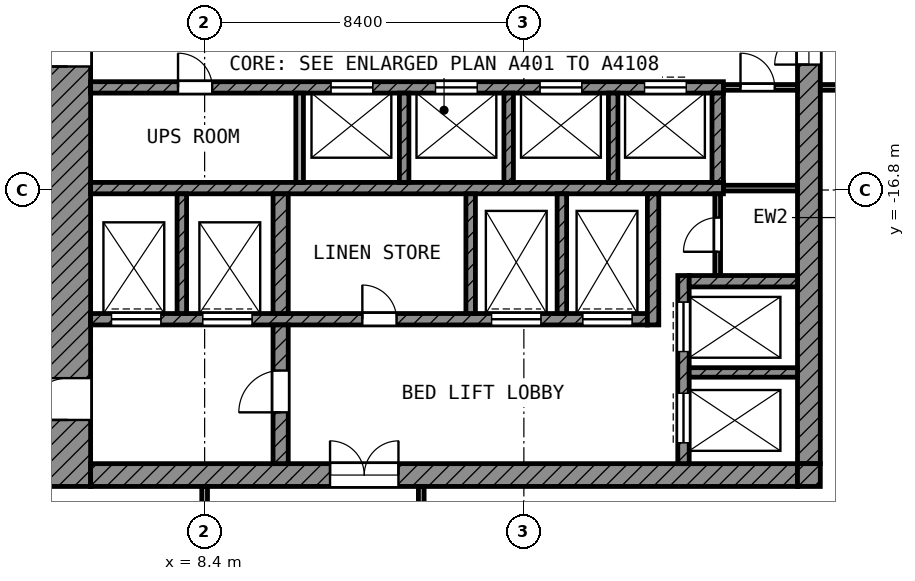
"""IFC4 building model, lengths in metres.
Left out: names, types, materials, properties, quantities, classifications, styles, units other than length and angle.
Written with IfcOpenShell. Run it as: python <this file> out.ifc"""

import sys

from ifc_helpers import new_model, si_unit, direction, frame, frame_2d, origin, place, context, subcontext, project, spatial, rectangle, extrude, element, fill, save


model = new_model("IFC4")
c1 = context("Model", 3, precision=1e-05, world=origin(), true_north=direction((0.0, 1.0)))
c2 = subcontext(c1, "Body", "Model", "MODEL_VIEW")
j1 = project(units=[si_unit("LENGTHUNIT", "METRE"), si_unit("PLANEANGLEUNIT", "RADIAN")], contexts=[c1])
p1 = place(None, origin())
s1 = spatial("IfcSite", under=j1, at=p1, CompositionType="ELEMENT")
p2 = place(p1, origin())
s2 = spatial("IfcBuilding", under=s1, at=p2, CompositionType="ELEMENT")
p3 = place(p2, frame((0.0, 0.0, 332.2)))
s3 = spatial("IfcBuildingStorey", under=s2, at=p3, CompositionType="ELEMENT", Elevation=332.2)
p4 = place(p3, frame((4.8, -24.6, 0.0), z_axis=(0.0, 0.0, 1.0), x_axis=(0.0, 1.0, 0.0)))
e1 = element("IfcWall", 1, at=p4, inside=s3, PredefinedType="SHEAR", context=c2, shape_type="SweptSolid", body=[
    extrude(rectangle(XDim=19.2, YDim=1.2, at=frame_2d((9.6, 0.0))), origin(), (0.0, 0.0, 1.0), 3.95),
])
p5 = place(p4, frame((11.05, 0.0, 0.0)))
e2 = element("IfcOpeningElement", 2, at=p5, cuts=e1, PredefinedType="OPENING", context=c2, shape_type="SweptSolid", body=[
    extrude(rectangle(XDim=1.1, YDim=2.1, at=frame_2d((0.55, 1.05))), frame((0.0, 0.61, 0.0), z_axis=(0.0, -1.0, 0.0), x_axis=(1.0, 0.0, 0.0)), (0.0, 0.0, 1.0), 1.22),
])
p6 = place(p4, frame((1.75, 0.0, 0.0)))
e3 = element("IfcOpeningElement", 3, at=p6, cuts=e1, PredefinedType="OPENING", context=c2, shape_type="SweptSolid", body=[
    extrude(rectangle(XDim=1.1, YDim=2.1, at=frame_2d((0.55, 1.05))), frame((0.0, 0.61, 0.0), z_axis=(0.0, -1.0, 0.0), x_axis=(1.0, 0.0, 0.0)), (0.0, 0.0, 1.0), 1.22),
])
p7 = place(p3, frame((24.3, -24.0, 0.0), z_axis=(0.0, 0.0, 1.0), x_axis=(0.0, 1.0, 0.0)))
e4 = element("IfcWall", 4, at=p7, inside=s3, PredefinedType="SHEAR", context=c2, shape_type="SweptSolid", body=[
    extrude(rectangle(XDim=18.6, YDim=0.6, at=frame_2d((9.3, 0.0))), origin(), (0.0, 0.0, 1.0), 3.95),
])
p8 = place(p7, frame((10.5, 0.0, 0.0)))
e5 = element("IfcOpeningElement", 5, at=p8, cuts=e4, PredefinedType="OPENING", context=c2, shape_type="SweptSolid", body=[
    extrude(rectangle(XDim=1.8, YDim=2.1, at=frame_2d((0.9, 1.05))), frame((0.0, 0.31, 0.0), z_axis=(0.0, -1.0, 0.0), x_axis=(1.0, 0.0, 0.0)), (0.0, 0.0, 1.0), 0.62),
])
p9 = place(p3, frame((5.4, -24.3, 0.0), z_axis=(0.0, 0.0, 1.0), x_axis=(1.0, 0.0, 0.0)))
e6 = element("IfcWall", 6, at=p9, inside=s3, PredefinedType="SHEAR", context=c2, shape_type="SweptSolid", body=[
    extrude(rectangle(XDim=18.6, YDim=0.6, at=frame_2d((9.3, 0.0))), origin(), (0.0, 0.0, 1.0), 3.95),
])
p10 = place(p9, frame((6.3, 0.0, 0.0)))
e7 = element("IfcOpeningElement", 7, at=p10, cuts=e6, PredefinedType="OPENING", context=c2, shape_type="SweptSolid", body=[
    extrude(rectangle(XDim=1.8, YDim=2.1, at=frame_2d((0.9, 1.05))), frame((0.0, 0.31, 0.0), z_axis=(0.0, -1.0, 0.0), x_axis=(1.0, 0.0, 0.0)), (0.0, 0.0, 1.0), 0.62),
])
p11 = place(p3, frame((24.3, -24.6, 0.0), z_axis=(0.0, 0.0, 1.0), x_axis=(0.0, 1.0, 0.0)))
e8 = element("IfcWall", 8, at=p11, inside=s3, PredefinedType="SHEAR", context=c2, shape_type="SweptSolid", body=[
    extrude(rectangle(XDim=0.6, YDim=0.6, at=frame_2d((0.3, 0.0))), origin(), (0.0, 0.0, 1.0), 3.95),
])
p12 = place(p3, frame((5.4, -14.1, 0.0), z_axis=(0.0, 0.0, 1.0), x_axis=(1.0, 0.0, 0.0)))
e9 = element("IfcWall", 9, at=p12, inside=s3, PredefinedType="SHEAR", context=c2, shape_type="SweptSolid", body=[
    extrude(rectangle(XDim=16.65, YDim=0.3, at=frame_2d((8.325, 0.0))), origin(), (0.0, 0.0, 1.0), 3.95),
])
p13 = place(p12, frame((6.325, 0.0, 0.0)))
e10 = element("IfcOpeningElement", 10, at=p13, cuts=e9, PredefinedType="OPENING", context=c2, shape_type="SweptSolid", body=[
    extrude(rectangle(XDim=1.1, YDim=2.1, at=frame_2d((0.55, 1.05))), frame((0.0, 0.16, 0.0), z_axis=(0.0, -1.0, 0.0), x_axis=(1.0, 0.0, 0.0)), (0.0, 0.0, 1.0), 0.32),
])
p14 = place(p12, frame((9.075, 0.0, 0.0)))
e11 = element("IfcOpeningElement", 11, at=p14, cuts=e9, PredefinedType="OPENING", context=c2, shape_type="SweptSolid", body=[
    extrude(rectangle(XDim=1.1, YDim=2.1, at=frame_2d((0.55, 1.05))), frame((0.0, 0.16, 0.0), z_axis=(0.0, -1.0, 0.0), x_axis=(1.0, 0.0, 0.0)), (0.0, 0.0, 1.0), 0.32),
])
p15 = place(p12, frame((11.825, 0.0, 0.0)))
e12 = element("IfcOpeningElement", 12, at=p15, cuts=e9, PredefinedType="OPENING", context=c2, shape_type="SweptSolid", body=[
    extrude(rectangle(XDim=1.1, YDim=2.1, at=frame_2d((0.55, 1.05))), frame((0.0, 0.16, 0.0), z_axis=(0.0, -1.0, 0.0), x_axis=(1.0, 0.0, 0.0)), (0.0, 0.0, 1.0), 0.32),
])
p16 = place(p12, frame((14.575, 0.0, 0.0)))
e13 = element("IfcOpeningElement", 13, at=p16, cuts=e9, PredefinedType="OPENING", context=c2, shape_type="SweptSolid", body=[
    extrude(rectangle(XDim=1.1, YDim=2.1, at=frame_2d((0.55, 1.05))), frame((0.0, 0.16, 0.0), z_axis=(0.0, -1.0, 0.0), x_axis=(1.0, 0.0, 0.0)), (0.0, 0.0, 1.0), 0.32),
])
p17 = place(p12, frame((2.3, 0.0, 0.0)))
e14 = element("IfcOpeningElement", 14, at=p17, cuts=e9, PredefinedType="OPENING", context=c2, shape_type="SweptSolid", body=[
    extrude(rectangle(XDim=0.9, YDim=2.1, at=frame_2d((0.45, 1.05))), frame((0.0, 0.16, 0.0), z_axis=(0.0, -1.0, 0.0), x_axis=(1.0, 0.0, 0.0)), (0.0, 0.0, 1.0), 0.32),
])
p18 = place(p3, frame((5.4, -16.75, 0.0), z_axis=(0.0, 0.0, 1.0), x_axis=(1.0, 0.0, 0.0)))
e15 = element("IfcWall", 15, at=p18, inside=s3, PredefinedType="SHEAR", context=c2, shape_type="SweptSolid", body=[
    extrude(rectangle(XDim=16.65, YDim=0.3, at=frame_2d((8.325, 0.0))), origin(), (0.0, 0.0, 1.0), 3.95),
])
p19 = place(p3, frame((5.4, -20.2, 0.0), z_axis=(0.0, 0.0, 1.0), x_axis=(1.0, 0.0, 0.0)))
e16 = element("IfcWall", 16, at=p19, inside=s3, PredefinedType="SHEAR", context=c2, shape_type="SweptSolid", body=[
    extrude(rectangle(XDim=14.65, YDim=0.3, at=frame_2d((7.325, 0.0))), origin(), (0.0, 0.0, 1.0), 3.95),
])
p20 = place(p19, frame((10.55, 0.0, 0.0)))
e17 = element("IfcOpeningElement", 17, at=p20, cuts=e16, PredefinedType="OPENING", context=c2, shape_type="SweptSolid", body=[
    extrude(rectangle(XDim=1.3, YDim=2.1, at=frame_2d((0.65, 1.05))), frame((0.0, 0.16, 0.0), z_axis=(0.0, -1.0, 0.0), x_axis=(1.0, 0.0, 0.0)), (0.0, 0.0, 1.0), 0.32),
])
p21 = place(p19, frame((12.95, 0.0, 0.0)))
e18 = element("IfcOpeningElement", 18, at=p21, cuts=e16, PredefinedType="OPENING", context=c2, shape_type="SweptSolid", body=[
    extrude(rectangle(XDim=1.3, YDim=2.1, at=frame_2d((0.65, 1.05))), frame((0.0, 0.16, 0.0), z_axis=(0.0, -1.0, 0.0), x_axis=(1.0, 0.0, 0.0)), (0.0, 0.0, 1.0), 0.32),
])
p22 = place(p19, frame((0.55, 0.0, 0.0)))
e19 = element("IfcOpeningElement", 19, at=p22, cuts=e16, PredefinedType="OPENING", context=c2, shape_type="SweptSolid", body=[
    extrude(rectangle(XDim=1.3, YDim=2.1, at=frame_2d((0.65, 1.05))), frame((0.0, 0.16, 0.0), z_axis=(0.0, -1.0, 0.0), x_axis=(1.0, 0.0, 0.0)), (0.0, 0.0, 1.0), 0.32),
])
p23 = place(p19, frame((2.95, 0.0, 0.0)))
e20 = element("IfcOpeningElement", 20, at=p23, cuts=e16, PredefinedType="OPENING", context=c2, shape_type="SweptSolid", body=[
    extrude(rectangle(XDim=1.3, YDim=2.1, at=frame_2d((0.65, 1.05))), frame((0.0, 0.16, 0.0), z_axis=(0.0, -1.0, 0.0), x_axis=(1.0, 0.0, 0.0)), (0.0, 0.0, 1.0), 0.32),
])
p24 = place(p19, frame((7.15, 0.0, 0.0)))
e21 = element("IfcOpeningElement", 21, at=p24, cuts=e16, PredefinedType="OPENING", context=c2, shape_type="SweptSolid", body=[
    extrude(rectangle(XDim=0.9, YDim=2.1, at=frame_2d((0.45, 1.05))), frame((0.0, 0.16, 0.0), z_axis=(0.0, -1.0, 0.0), x_axis=(1.0, 0.0, 0.0)), (0.0, 0.0, 1.0), 0.32),
])
p25 = place(p3, frame((10.4, -24.0, 0.0), z_axis=(0.0, 0.0, 1.0), x_axis=(0.0, 1.0, 0.0)))
e22 = element("IfcWall", 22, at=p25, inside=s3, PredefinedType="SHEAR", context=c2, shape_type="SweptSolid", body=[
    extrude(rectangle(XDim=3.65, YDim=0.4, at=frame_2d((1.825, 0.0))), origin(), (0.0, 0.0, 1.0), 3.95),
])
p26 = place(p25, frame((1.35, 0.0, 0.0)))
e23 = element("IfcOpeningElement", 23, at=p26, cuts=e22, PredefinedType="OPENING", context=c2, shape_type="SweptSolid", body=[
    extrude(rectangle(XDim=1.1, YDim=2.1, at=frame_2d((0.55, 1.05))), frame((0.0, 0.21, 0.0), z_axis=(0.0, -1.0, 0.0), x_axis=(1.0, 0.0, 0.0)), (0.0, 0.0, 1.0), 0.42),
])
p27 = place(p3, frame((10.4, -20.05, 0.0), z_axis=(0.0, 0.0, 1.0), x_axis=(0.0, 1.0, 0.0)))
e24 = element("IfcWall", 24, at=p27, inside=s3, PredefinedType="SHEAR", context=c2, shape_type="SweptSolid", body=[
    extrude(rectangle(XDim=3.15, YDim=0.4, at=frame_2d((1.575, 0.0))), origin(), (0.0, 0.0, 1.0), 3.95),
])
p28 = place(p3, frame((20.2, -20.35, 0.0), z_axis=(0.0, 0.0, 1.0), x_axis=(0.0, 1.0, 0.0)))
e25 = element("IfcWall", 25, at=p28, inside=s3, PredefinedType="SHEAR", context=c2, shape_type="SweptSolid", body=[
    extrude(rectangle(XDim=3.45, YDim=0.3, at=frame_2d((1.725, 0.0))), origin(), (0.0, 0.0, 1.0), 3.95),
])
p29 = place(p3, frame((21.9, -16.6, 0.0), z_axis=(0.0, 0.0, 1.0), x_axis=(0.0, 1.0, 0.0)))
e26 = element("IfcWall", 26, at=p29, inside=s3, PredefinedType="SHEAR", context=c2, shape_type="SweptSolid", body=[
    extrude(rectangle(XDim=2.35, YDim=0.3, at=frame_2d((1.175, 0.0))), origin(), (0.0, 0.0, 1.0), 3.95),
])
p30 = place(p3, frame((21.15, -19.2, 0.0), z_axis=(0.0, 0.0, 1.0), x_axis=(1.0, 0.0, 0.0)))
e27 = element("IfcWall", 27, at=p30, inside=s3, PredefinedType="SHEAR", context=c2, shape_type="SweptSolid", body=[
    extrude(rectangle(XDim=2.85, YDim=0.3, at=frame_2d((1.425, 0.0))), origin(), (0.0, 0.0, 1.0), 3.95),
])
p31 = place(p3, frame((21.0, -24.0, 0.0), z_axis=(0.0, 0.0, 1.0), x_axis=(0.0, 1.0, 0.0)))
e28 = element("IfcWall", 28, at=p31, inside=s3, PredefinedType="SHEAR", context=c2, shape_type="SweptSolid", body=[
    extrude(rectangle(XDim=4.95, YDim=0.3, at=frame_2d((2.475, 0.0))), origin(), (0.0, 0.0, 1.0), 3.95),
])
p32 = place(p31, frame((2.95, 0.0, 0.0)))
e29 = element("IfcOpeningElement", 29, at=p32, cuts=e28, PredefinedType="OPENING", context=c2, shape_type="SweptSolid", body=[
    extrude(rectangle(XDim=1.3, YDim=2.1, at=frame_2d((0.65, 1.05))), frame((0.0, 0.16, 0.0), z_axis=(0.0, -1.0, 0.0), x_axis=(1.0, 0.0, 0.0)), (0.0, 0.0, 1.0), 0.32),
])
p33 = place(p31, frame((0.55, 0.0, 0.0)))
e30 = element("IfcOpeningElement", 30, at=p33, cuts=e28, PredefinedType="OPENING", context=c2, shape_type="SweptSolid", body=[
    extrude(rectangle(XDim=1.3, YDim=2.1, at=frame_2d((0.65, 1.05))), frame((0.0, 0.16, 0.0), z_axis=(0.0, -1.0, 0.0), x_axis=(1.0, 0.0, 0.0)), (0.0, 0.0, 1.0), 0.32),
])
p34 = place(p3, frame((21.15, -21.6, 0.0), z_axis=(0.0, 0.0, 1.0), x_axis=(1.0, 0.0, 0.0)))
e31 = element("IfcWall", 31, at=p34, inside=s3, PredefinedType="SHEAR", context=c2, shape_type="SweptSolid", body=[
    extrude(rectangle(XDim=2.85, YDim=0.25, at=frame_2d((1.425, 0.0))), origin(), (0.0, 0.0, 1.0), 3.95),
])
for number, where, z_axis, x_axis in (
    (32, (7.8, -20.05, 0.0), (0.0, 0.0, 1.0), (0.0, 1.0, 0.0)),
    (33, (15.4, -20.05, 0.0), (0.0, 0.0, 1.0), (0.0, 1.0, 0.0)),
    (34, (17.8, -20.05, 0.0), (0.0, 0.0, 1.0), (0.0, 1.0, 0.0)),
):
    element("IfcWall", number, at=place(p3, frame(where, z_axis=z_axis, x_axis=x_axis)), inside=s3, PredefinedType="SHEAR", context=c2, shape_type="SweptSolid", body=[
        extrude(rectangle(XDim=3.15, YDim=0.25, at=frame_2d((1.575, 0.0))), origin(), (0.0, 0.0, 1.0), 3.95),
    ])
p35 = place(p3, frame((10.9, -16.6, 0.0), z_axis=(0.0, 0.0, 1.0), x_axis=(0.0, 1.0, 0.0)))
e35 = element("IfcWall", 35, at=p35, inside=s3, PredefinedType="PARTITIONING", context=c2, shape_type="SweptSolid", body=[
    extrude(rectangle(XDim=2.35, YDim=0.2, at=frame_2d((1.175, 0.0))), origin(), (0.0, 0.0, 1.0), 3.95),
])
for number, where, z_axis, x_axis in (
    (36, (13.65, -16.6, 0.0), (0.0, 0.0, 1.0), (0.0, 1.0, 0.0)),
    (37, (16.4, -16.6, 0.0), (0.0, 0.0, 1.0), (0.0, 1.0, 0.0)),
    (38, (19.15, -16.6, 0.0), (0.0, 0.0, 1.0), (0.0, 1.0, 0.0)),
):
    element("IfcWall", number, at=place(p3, frame(where, z_axis=z_axis, x_axis=x_axis)), inside=s3, PredefinedType="SHEAR", context=c2, shape_type="SweptSolid", body=[
        extrude(rectangle(XDim=2.35, YDim=0.25, at=frame_2d((1.175, 0.0))), origin(), (0.0, 0.0, 1.0), 3.95),
    ])
p36 = place(p3, frame((21.9, -19.05, 0.0), z_axis=(0.0, 0.0, 1.0), x_axis=(0.0, 1.0, 0.0)))
e39 = element("IfcWall", 39, at=p36, inside=s3, PredefinedType="PARTITIONING", context=c2, shape_type="SweptSolid", body=[
    extrude(rectangle(XDim=2.15, YDim=0.15, at=frame_2d((1.075, 0.0))), origin(), (0.0, 0.0, 1.0), 3.95),
])
p37 = place(p36, frame((0.625, 0.0, 0.0)))
e40 = element("IfcOpeningElement", 40, at=p37, cuts=e39, PredefinedType="OPENING", context=c2, shape_type="SweptSolid", body=[
    extrude(rectangle(XDim=0.9, YDim=2.1, at=frame_2d((0.45, 1.05))), frame((0.0, 0.085, 0.0), z_axis=(0.0, -1.0, 0.0), x_axis=(1.0, 0.0, 0.0)), (0.0, 0.0, 1.0), 0.17),
])
p38 = place(p3, frame((22.05, -16.75, 0.0), z_axis=(0.0, 0.0, 1.0), x_axis=(1.0, 0.0, 0.0)))
e41 = element("IfcWall", 41, at=p38, inside=s3, PredefinedType="PARTITIONING", context=c2, shape_type="SweptSolid", body=[
    extrude(rectangle(XDim=1.95, YDim=0.15, at=frame_2d((0.975, 0.0))), origin(), (0.0, 0.0, 1.0), 3.95),
])
p39 = place(p3, frame((22.05, -14.1, 0.0), z_axis=(0.0, 0.0, 1.0), x_axis=(1.0, 0.0, 0.0)))
e42 = element("IfcWall", 42, at=p39, inside=s3, PredefinedType="PARTITIONING", context=c2, shape_type="SweptSolid", body=[
    extrude(rectangle(XDim=1.95, YDim=0.15, at=frame_2d((0.975, 0.0))), origin(), (0.0, 0.0, 1.0), 3.95),
])
p40 = place(p39, frame((0.45, 0.0, 0.0)))
e43 = element("IfcOpeningElement", 43, at=p40, cuts=e42, PredefinedType="OPENING", context=c2, shape_type="SweptSolid", body=[
    extrude(rectangle(XDim=0.9, YDim=2.1, at=frame_2d((0.45, 1.05))), frame((0.0, 0.085, 0.0), z_axis=(0.0, -1.0, 0.0), x_axis=(1.0, 0.0, 0.0)), (0.0, 0.0, 1.0), 0.17),
])
p41 = place(p3, frame((24.6, -14.1, 0.0), z_axis=(0.0, 0.0, 1.0), x_axis=(1.0, 0.0, 0.0)))
e44 = element("IfcWall", 44, at=p41, inside=s3, PredefinedType="PARTITIONING", context=c2, shape_type="SweptSolid", body=[
    extrude(rectangle(XDim=4.725, YDim=0.15, at=frame_2d((2.362, 0.0))), origin(), (0.0, 0.0, 1.0), 3.95),
])
p42 = place(p41, frame((2.2, 0.0, 0.0)))
e45 = element("IfcOpeningElement", 45, at=p42, cuts=e44, PredefinedType="OPENING", context=c2, shape_type="SweptSolid", body=[
    extrude(rectangle(XDim=1.0, YDim=2.1, at=frame_2d((0.5, 1.05))), frame((0.0, 0.085, 0.0), z_axis=(0.0, -1.0, 0.0), x_axis=(1.0, 0.0, 0.0)), (0.0, 0.0, 1.0), 0.17),
])
p43 = place(p3, frame((8.4, -32.007, 0.0), z_axis=(0.0, 0.0, 1.0), x_axis=(0.0, 1.0, 0.0)))
e46 = element("IfcWall", 46, at=p43, inside=s3, PredefinedType="PARTITIONING", context=c2, shape_type="SweptSolid", body=[
    extrude(rectangle(XDim=7.407, YDim=0.15, at=frame_2d((3.704, 0.0))), origin(), (0.0, 0.0, 1.0), 3.95),
])
p44 = place(p43, frame((4.107, 0.0, 0.0)))
e47 = element("IfcOpeningElement", 47, at=p44, cuts=e46, PredefinedType="OPENING", context=c2, shape_type="SweptSolid", body=[
    extrude(rectangle(XDim=0.9, YDim=2.1, at=frame_2d((0.45, 1.05))), frame((0.0, 0.085, 0.0), z_axis=(0.0, -1.0, 0.0), x_axis=(1.0, 0.0, 0.0)), (0.0, 0.0, 1.0), 0.17),
])
p45 = place(p3, frame((14.1, -29.325, 0.0), z_axis=(0.0, 0.0, 1.0), x_axis=(0.0, 1.0, 0.0)))
e48 = element("IfcWall", 48, at=p45, inside=s3, PredefinedType="PARTITIONING", context=c2, shape_type="SweptSolid", body=[
    extrude(rectangle(XDim=4.725, YDim=0.15, at=frame_2d((2.362, 0.0))), origin(), (0.0, 0.0, 1.0), 3.95),
])
p46 = place(p13, origin())
e49 = element("IfcDoor", 49, at=p46, inside=s3, OperationType="DOUBLE_DOOR_SLIDING", PredefinedType="DOOR", context=c2, shape_type="SweptSolid", body=[
    extrude(rectangle(XDim=1.1, YDim=2.1, at=frame_2d((0.55, 1.05))), frame((0.0, 0.025, 0.0), z_axis=(0.0, -1.0, 0.0), x_axis=(1.0, 0.0, 0.0)), (0.0, 0.0, 1.0), 0.05),
])
fill(e10, e49)
p47 = place(p14, origin())
e50 = element("IfcDoor", 50, at=p47, inside=s3, OperationType="DOUBLE_DOOR_SLIDING", PredefinedType="DOOR", context=c2, shape_type="SweptSolid", body=[
    extrude(rectangle(XDim=1.1, YDim=2.1, at=frame_2d((0.55, 1.05))), frame((0.0, 0.025, 0.0), z_axis=(0.0, -1.0, 0.0), x_axis=(1.0, 0.0, 0.0)), (0.0, 0.0, 1.0), 0.05),
])
fill(e11, e50)
p48 = place(p15, origin())
e51 = element("IfcDoor", 51, at=p48, inside=s3, OperationType="DOUBLE_DOOR_SLIDING", PredefinedType="DOOR", context=c2, shape_type="SweptSolid", body=[
    extrude(rectangle(XDim=1.1, YDim=2.1, at=frame_2d((0.55, 1.05))), frame((0.0, 0.025, 0.0), z_axis=(0.0, -1.0, 0.0), x_axis=(1.0, 0.0, 0.0)), (0.0, 0.0, 1.0), 0.05),
])
fill(e12, e51)
p49 = place(p16, origin())
e52 = element("IfcDoor", 52, at=p49, inside=s3, OperationType="DOUBLE_DOOR_SLIDING", PredefinedType="DOOR", context=c2, shape_type="SweptSolid", body=[
    extrude(rectangle(XDim=1.1, YDim=2.1, at=frame_2d((0.55, 1.05))), frame((0.0, 0.025, 0.0), z_axis=(0.0, -1.0, 0.0), x_axis=(1.0, 0.0, 0.0)), (0.0, 0.0, 1.0), 0.05),
])
fill(e13, e52)
p50 = place(p32, origin())
e53 = element("IfcDoor", 53, at=p50, inside=s3, OperationType="DOUBLE_DOOR_SLIDING", PredefinedType="DOOR", context=c2, shape_type="SweptSolid", body=[
    extrude(rectangle(XDim=1.3, YDim=2.1, at=frame_2d((0.65, 1.05))), frame((0.0, 0.025, 0.0), z_axis=(0.0, -1.0, 0.0), x_axis=(1.0, 0.0, 0.0)), (0.0, 0.0, 1.0), 0.05),
])
fill(e29, e53)
p51 = place(p33, origin())
e54 = element("IfcDoor", 54, at=p51, inside=s3, OperationType="DOUBLE_DOOR_SLIDING", PredefinedType="DOOR", context=c2, shape_type="SweptSolid", body=[
    extrude(rectangle(XDim=1.3, YDim=2.1, at=frame_2d((0.65, 1.05))), frame((0.0, 0.025, 0.0), z_axis=(0.0, -1.0, 0.0), x_axis=(1.0, 0.0, 0.0)), (0.0, 0.0, 1.0), 0.05),
])
fill(e30, e54)
p52 = place(p20, origin())
e55 = element("IfcDoor", 55, at=p52, inside=s3, OperationType="DOUBLE_DOOR_SLIDING", PredefinedType="DOOR", context=c2, shape_type="SweptSolid", body=[
    extrude(rectangle(XDim=1.3, YDim=2.1, at=frame_2d((0.65, 1.05))), frame((0.0, 0.025, 0.0), z_axis=(0.0, -1.0, 0.0), x_axis=(1.0, 0.0, 0.0)), (0.0, 0.0, 1.0), 0.05),
])
fill(e17, e55)
p53 = place(p21, origin())
e56 = element("IfcDoor", 56, at=p53, inside=s3, OperationType="DOUBLE_DOOR_SLIDING", PredefinedType="DOOR", context=c2, shape_type="SweptSolid", body=[
    extrude(rectangle(XDim=1.3, YDim=2.1, at=frame_2d((0.65, 1.05))), frame((0.0, 0.025, 0.0), z_axis=(0.0, -1.0, 0.0), x_axis=(1.0, 0.0, 0.0)), (0.0, 0.0, 1.0), 0.05),
])
fill(e18, e56)
p54 = place(p22, origin())
e57 = element("IfcDoor", 57, at=p54, inside=s3, OperationType="DOUBLE_DOOR_SLIDING", PredefinedType="DOOR", context=c2, shape_type="SweptSolid", body=[
    extrude(rectangle(XDim=1.3, YDim=2.1, at=frame_2d((0.65, 1.05))), frame((0.0, 0.025, 0.0), z_axis=(0.0, -1.0, 0.0), x_axis=(1.0, 0.0, 0.0)), (0.0, 0.0, 1.0), 0.05),
])
fill(e19, e57)
p55 = place(p23, origin())
e58 = element("IfcDoor", 58, at=p55, inside=s3, OperationType="DOUBLE_DOOR_SLIDING", PredefinedType="DOOR", context=c2, shape_type="SweptSolid", body=[
    extrude(rectangle(XDim=1.3, YDim=2.1, at=frame_2d((0.65, 1.05))), frame((0.0, 0.025, 0.0), z_axis=(0.0, -1.0, 0.0), x_axis=(1.0, 0.0, 0.0)), (0.0, 0.0, 1.0), 0.05),
])
fill(e20, e58)
p56 = place(p5, origin())
e59 = element("IfcDoor", 59, at=p56, inside=s3, OperationType="SINGLE_SWING_LEFT", PredefinedType="DOOR", context=c2, shape_type="SweptSolid", body=[
    extrude(rectangle(XDim=1.1, YDim=2.1, at=frame_2d((0.55, 1.05))), frame((0.0, 0.025, 0.0), z_axis=(0.0, -1.0, 0.0), x_axis=(1.0, 0.0, 0.0)), (0.0, 0.0, 1.0), 0.05),
])
fill(e2, e59)
p57 = place(p6, origin())
e60 = element("IfcDoor", 60, at=p57, inside=s3, OperationType="SINGLE_SWING_LEFT", PredefinedType="DOOR", context=c2, shape_type="SweptSolid", body=[
    extrude(rectangle(XDim=1.1, YDim=2.1, at=frame_2d((0.55, 1.05))), frame((0.0, 0.025, 0.0), z_axis=(0.0, -1.0, 0.0), x_axis=(1.0, 0.0, 0.0)), (0.0, 0.0, 1.0), 0.05),
])
fill(e3, e60)
p58 = place(p26, origin())
e61 = element("IfcDoor", 61, at=p58, inside=s3, OperationType="SINGLE_SWING_LEFT", PredefinedType="DOOR", context=c2, shape_type="SweptSolid", body=[
    extrude(rectangle(XDim=1.1, YDim=2.1, at=frame_2d((0.55, 1.05))), frame((0.0, 0.025, 0.0), z_axis=(0.0, -1.0, 0.0), x_axis=(1.0, 0.0, 0.0)), (0.0, 0.0, 1.0), 0.05),
])
fill(e23, e61)
p59 = place(p8, origin())
e62 = element("IfcDoor", 62, at=p59, inside=s3, OperationType="DOUBLE_DOOR_SINGLE_SWING", PredefinedType="DOOR", context=c2, shape_type="SweptSolid", body=[
    extrude(rectangle(XDim=1.8, YDim=2.1, at=frame_2d((0.9, 1.05))), frame((0.0, 0.025, 0.0), z_axis=(0.0, -1.0, 0.0), x_axis=(1.0, 0.0, 0.0)), (0.0, 0.0, 1.0), 0.05),
])
fill(e5, e62)
p60 = place(p10, origin())
e63 = element("IfcDoor", 63, at=p60, inside=s3, OperationType="DOUBLE_DOOR_SINGLE_SWING", PredefinedType="DOOR", context=c2, shape_type="SweptSolid", body=[
    extrude(rectangle(XDim=1.8, YDim=2.1, at=frame_2d((0.9, 1.05))), frame((0.0, 0.025, 0.0), z_axis=(0.0, -1.0, 0.0), x_axis=(1.0, 0.0, 0.0)), (0.0, 0.0, 1.0), 0.05),
])
fill(e7, e63)
p61 = place(p40, origin())
e64 = element("IfcDoor", 64, at=p61, inside=s3, OperationType="SINGLE_SWING_LEFT", PredefinedType="DOOR", context=c2, shape_type="SweptSolid", body=[
    extrude(rectangle(XDim=0.9, YDim=2.1, at=frame_2d((0.45, 1.05))), frame((0.0, 0.025, 0.0), z_axis=(0.0, -1.0, 0.0), x_axis=(1.0, 0.0, 0.0)), (0.0, 0.0, 1.0), 0.05),
])
fill(e43, e64)
p62 = place(p37, origin())
e65 = element("IfcDoor", 65, at=p62, inside=s3, OperationType="SINGLE_SWING_LEFT", PredefinedType="DOOR", context=c2, shape_type="SweptSolid", body=[
    extrude(rectangle(XDim=0.9, YDim=2.1, at=frame_2d((0.45, 1.05))), frame((0.0, 0.025, 0.0), z_axis=(0.0, -1.0, 0.0), x_axis=(1.0, 0.0, 0.0)), (0.0, 0.0, 1.0), 0.05),
])
fill(e40, e65)
p63 = place(p24, origin())
e66 = element("IfcDoor", 66, at=p63, inside=s3, OperationType="SINGLE_SWING_LEFT", PredefinedType="DOOR", context=c2, shape_type="SweptSolid", body=[
    extrude(rectangle(XDim=0.9, YDim=2.1, at=frame_2d((0.45, 1.05))), frame((0.0, 0.025, 0.0), z_axis=(0.0, -1.0, 0.0), x_axis=(1.0, 0.0, 0.0)), (0.0, 0.0, 1.0), 0.05),
])
fill(e21, e66)
p64 = place(p17, origin())
e67 = element("IfcDoor", 67, at=p64, inside=s3, OperationType="SINGLE_SWING_LEFT", PredefinedType="DOOR", context=c2, shape_type="SweptSolid", body=[
    extrude(rectangle(XDim=0.9, YDim=2.1, at=frame_2d((0.45, 1.05))), frame((0.0, 0.025, 0.0), z_axis=(0.0, -1.0, 0.0), x_axis=(1.0, 0.0, 0.0)), (0.0, 0.0, 1.0), 0.05),
])
fill(e14, e67)
save(model, sys.argv[1])
